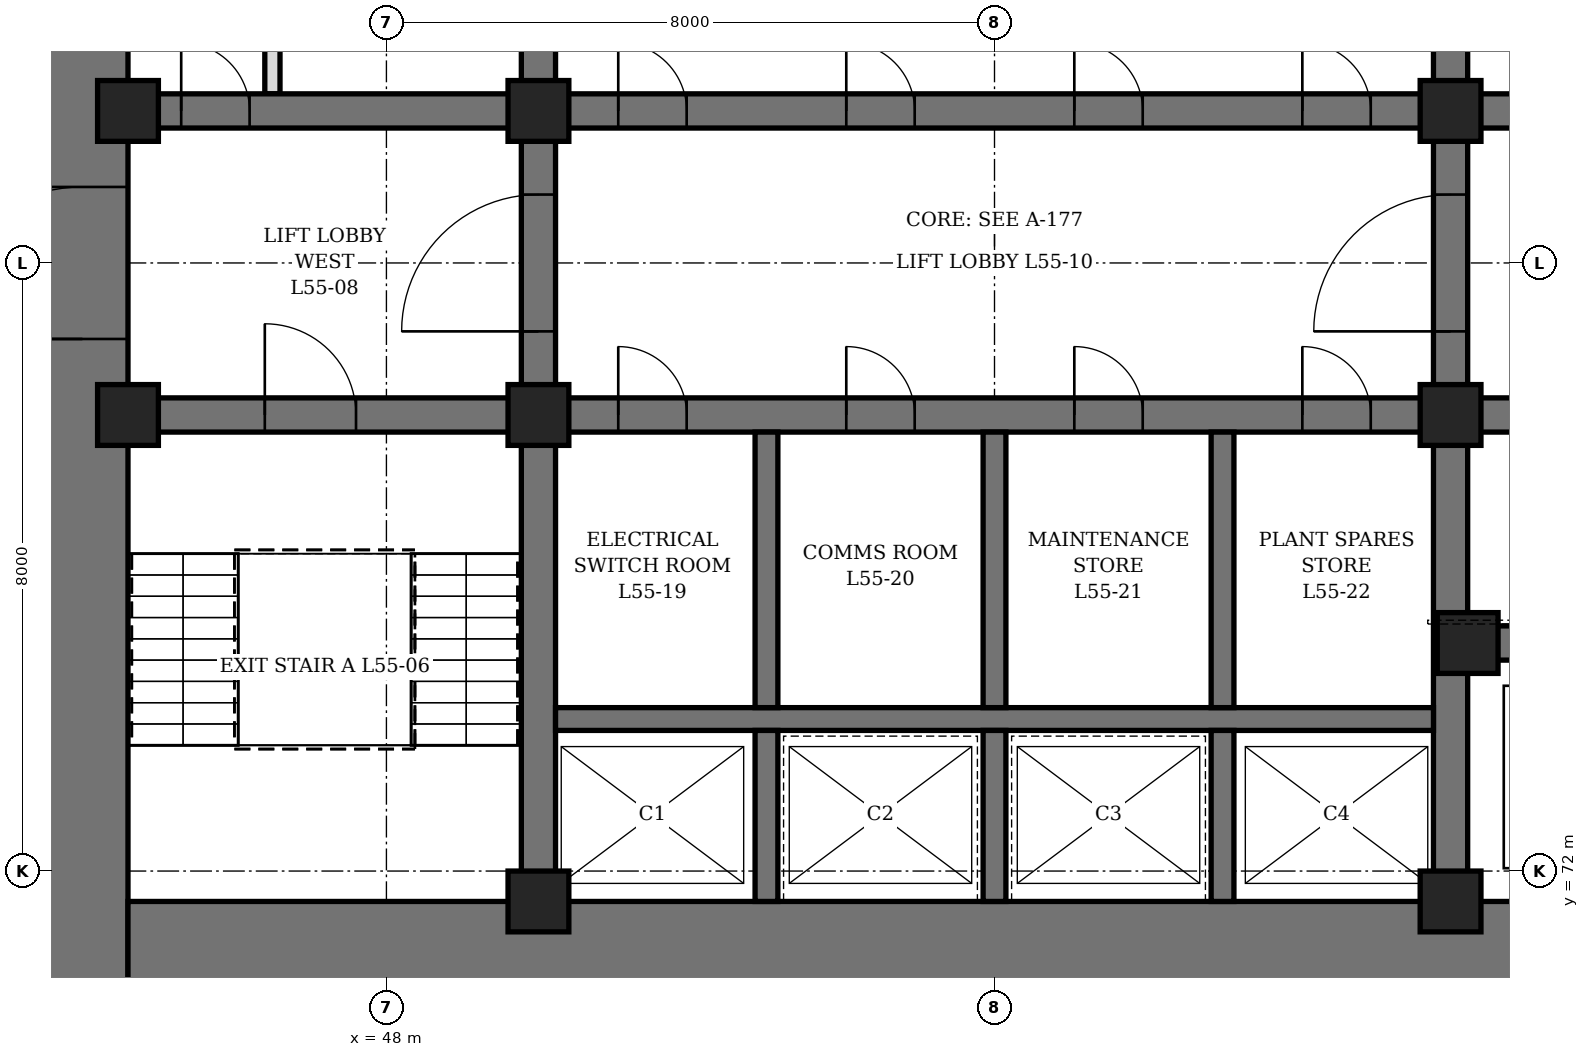
"""IFC4 building model, lengths in metres.
Left out: names, types, materials, properties, quantities, classifications, styles, units other than length and angle.
Written with IfcOpenShell. Run it as: python <this file> out.ifc"""

import sys

from ifc_helpers import new_model, si_unit, direction, frame, frame_2d, origin, origin_2d, place, context, subcontext, project, spatial, rectangle, hollow_rectangle, extrude, element, fill, save


model = new_model("IFC4")
c1 = context("Model", 3, precision=1e-05, world=origin(), true_north=direction((0.0, 1.0)))
c2 = subcontext(c1, "Body", "Model", "MODEL_VIEW")
j1 = project(units=[si_unit("LENGTHUNIT", "METRE"), si_unit("PLANEANGLEUNIT", "RADIAN")], contexts=[c1])
p1 = place(None, origin())
s1 = spatial("IfcSite", under=j1, at=p1, CompositionType="ELEMENT")
p2 = place(p1, origin())
s2 = spatial("IfcBuilding", under=s1, at=p2, CompositionType="ELEMENT")
p3 = place(p2, frame((0.0, 0.0, 244.3)))
s3 = spatial("IfcBuildingStorey", under=s2, at=p3, CompositionType="ELEMENT", Elevation=244.3)
p4 = place(p3, frame((44.0, 70.4, 0.0), z_axis=(0.0, 0.0, 1.0), x_axis=(0.0, 1.0, 0.0)))
e1 = element("IfcWall", 1, at=p4, inside=s3, PredefinedType="SHEAR", context=c2, shape_type="SweptSolid", body=[
    extrude(rectangle(XDim=19.2, YDim=1.2, at=frame_2d((9.6, 0.0))), origin(), (0.0, 0.0, 1.0), 6.0),
])
p5 = place(p4, frame((8.6, 0.0, 0.0)))
e2 = element("IfcOpeningElement", 2, at=p5, cuts=e1, PredefinedType="OPENING", context=c2, shape_type="SweptSolid", body=[
    extrude(rectangle(XDim=2.0, YDim=2.4, at=frame_2d((1.0, 1.2))), frame((0.0, 0.61, 0.0), z_axis=(0.0, -1.0, 0.0), x_axis=(1.0, 0.0, 0.0)), (0.0, 0.0, 1.0), 1.22),
])
p6 = place(p3, frame((44.6, 71.0, 0.0), z_axis=(0.0, 0.0, 1.0), x_axis=(1.0, 0.0, 0.0)))
e3 = element("IfcWall", 3, at=p6, inside=s3, PredefinedType="SHEAR", context=c2, shape_type="SweptSolid", body=[
    extrude(rectangle(XDim=22.8, YDim=1.2, at=frame_2d((11.4, 0.0))), origin(), (0.0, 0.0, 1.0), 6.0),
])
p7 = place(p3, frame((50.0, 71.6, 0.0), z_axis=(0.0, 0.0, 1.0), x_axis=(0.0, 1.0, 0.0)))
e4 = element("IfcWall", 4, at=p7, inside=s3, PredefinedType="SHEAR", context=c2, shape_type="SweptSolid", body=[
    extrude(rectangle(XDim=16.8, YDim=0.45, at=frame_2d((8.4, 0.0))), origin(), (0.0, 0.0, 1.0), 6.0),
])
p8 = place(p7, frame((7.5, 0.0, 0.0)))
e5 = element("IfcOpeningElement", 5, at=p8, cuts=e4, PredefinedType="OPENING", context=c2, shape_type="SweptSolid", body=[
    extrude(rectangle(XDim=1.8, YDim=2.4, at=frame_2d((0.9, 1.2))), frame((0.0, 0.235, 0.0), z_axis=(0.0, -1.0, 0.0), x_axis=(1.0, 0.0, 0.0)), (0.0, 0.0, 1.0), 0.47),
])
p9 = place(p3, frame((62.0, 71.6, 0.0), z_axis=(0.0, 0.0, 1.0), x_axis=(0.0, 1.0, 0.0)))
e6 = element("IfcWall", 6, at=p9, inside=s3, PredefinedType="SHEAR", context=c2, shape_type="SweptSolid", body=[
    extrude(rectangle(XDim=16.8, YDim=0.45, at=frame_2d((8.4, 0.0))), origin(), (0.0, 0.0, 1.0), 6.0),
])
p10 = place(p9, frame((7.5, 0.0, 0.0)))
e7 = element("IfcOpeningElement", 7, at=p10, cuts=e6, PredefinedType="OPENING", context=c2, shape_type="SweptSolid", body=[
    extrude(rectangle(XDim=1.8, YDim=2.4, at=frame_2d((0.9, 1.2))), frame((0.0, 0.235, 0.0), z_axis=(0.0, -1.0, 0.0), x_axis=(1.0, 0.0, 0.0)), (0.0, 0.0, 1.0), 0.47),
])
p11 = place(p3, frame((44.6, 78.0, 0.0), z_axis=(0.0, 0.0, 1.0), x_axis=(1.0, 0.0, 0.0)))
e8 = element("IfcWall", 8, at=p11, inside=s3, PredefinedType="SHEAR", context=c2, shape_type="SweptSolid", body=[
    extrude(rectangle(XDim=5.175, YDim=0.45, at=frame_2d((2.587, 0.0))), origin(), (0.0, 0.0, 1.0), 6.0),
])
p12 = place(p11, frame((1.8, 0.0, 0.0)))
e9 = element("IfcOpeningElement", 9, at=p12, cuts=e8, PredefinedType="OPENING", context=c2, shape_type="SweptSolid", body=[
    extrude(rectangle(XDim=1.2, YDim=2.1, at=frame_2d((0.6, 1.05))), frame((0.0, 0.235, 0.0), z_axis=(0.0, -1.0, 0.0), x_axis=(1.0, 0.0, 0.0)), (0.0, 0.0, 1.0), 0.47),
])
p13 = place(p3, frame((44.6, 82.0, 0.0), z_axis=(0.0, 0.0, 1.0), x_axis=(1.0, 0.0, 0.0)))
e10 = element("IfcWall", 10, at=p13, inside=s3, PredefinedType="SHEAR", context=c2, shape_type="SweptSolid", body=[
    extrude(rectangle(XDim=5.175, YDim=0.45, at=frame_2d((2.587, 0.0))), origin(), (0.0, 0.0, 1.0), 6.0),
])
p14 = place(p13, frame((0.7, 0.0, 0.0)))
e11 = element("IfcOpeningElement", 11, at=p14, cuts=e10, PredefinedType="OPENING", context=c2, shape_type="SweptSolid", body=[
    extrude(rectangle(XDim=0.9, YDim=2.1, at=frame_2d((0.45, 1.05))), frame((0.0, 0.235, 0.0), z_axis=(0.0, -1.0, 0.0), x_axis=(1.0, 0.0, 0.0)), (0.0, 0.0, 1.0), 0.47),
])
p15 = place(p3, frame((62.225, 75.0, 0.0), z_axis=(0.0, 0.0, 1.0), x_axis=(1.0, 0.0, 0.0)))
e12 = element("IfcWall", 12, at=p15, inside=s3, PredefinedType="SHEAR", context=c2, shape_type="SweptSolid", body=[
    extrude(rectangle(XDim=5.175, YDim=0.45, at=frame_2d((2.587, 0.0))), origin(), (0.0, 0.0, 1.0), 6.0),
])
p16 = place(p15, frame((0.675, 0.0, 0.0)))
e13 = element("IfcOpeningElement", 13, at=p16, cuts=e12, PredefinedType="OPENING", context=c2, shape_type="SweptSolid", body=[
    extrude(rectangle(XDim=1.2, YDim=2.2, at=frame_2d((0.6, 1.1))), frame((0.0, 0.235, 0.0), z_axis=(0.0, -1.0, 0.0), x_axis=(1.0, 0.0, 0.0)), (0.0, 0.0, 1.0), 0.47),
])
p17 = place(p15, frame((3.425, 0.0, 0.0)))
e14 = element("IfcOpeningElement", 14, at=p17, cuts=e12, PredefinedType="OPENING", context=c2, shape_type="SweptSolid", body=[
    extrude(rectangle(XDim=1.2, YDim=2.2, at=frame_2d((0.6, 1.1))), frame((0.0, 0.235, 0.0), z_axis=(0.0, -1.0, 0.0), x_axis=(1.0, 0.0, 0.0)), (0.0, 0.0, 1.0), 0.47),
])
p18 = place(p3, frame((62.225, 78.0, 0.0), z_axis=(0.0, 0.0, 1.0), x_axis=(1.0, 0.0, 0.0)))
e15 = element("IfcWall", 15, at=p18, inside=s3, PredefinedType="SHEAR", context=c2, shape_type="SweptSolid", body=[
    extrude(rectangle(XDim=5.175, YDim=0.45, at=frame_2d((2.587, 0.0))), origin(), (0.0, 0.0, 1.0), 6.0),
])
p19 = place(p18, frame((2.175, 0.0, 0.0)))
e16 = element("IfcOpeningElement", 16, at=p19, cuts=e15, PredefinedType="OPENING", context=c2, shape_type="SweptSolid", body=[
    extrude(rectangle(XDim=1.2, YDim=2.1, at=frame_2d((0.6, 1.05))), frame((0.0, 0.235, 0.0), z_axis=(0.0, -1.0, 0.0), x_axis=(1.0, 0.0, 0.0)), (0.0, 0.0, 1.0), 0.47),
])
p20 = place(p3, frame((62.225, 82.0, 0.0), z_axis=(0.0, 0.0, 1.0), x_axis=(1.0, 0.0, 0.0)))
e17 = element("IfcWall", 17, at=p20, inside=s3, PredefinedType="SHEAR", context=c2, shape_type="SweptSolid", body=[
    extrude(rectangle(XDim=5.175, YDim=0.45, at=frame_2d((2.587, 0.0))), origin(), (0.0, 0.0, 1.0), 6.0),
])
p21 = place(p20, frame((2.175, 0.0, 0.0)))
e18 = element("IfcOpeningElement", 18, at=p21, cuts=e17, PredefinedType="OPENING", context=c2, shape_type="SweptSolid", body=[
    extrude(rectangle(XDim=1.2, YDim=2.1, at=frame_2d((0.6, 1.05))), frame((0.0, 0.235, 0.0), z_axis=(0.0, -1.0, 0.0), x_axis=(1.0, 0.0, 0.0)), (0.0, 0.0, 1.0), 0.47),
])
p22 = place(p3, frame((50.225, 78.0, 0.0), z_axis=(0.0, 0.0, 1.0), x_axis=(1.0, 0.0, 0.0)))
e19 = element("IfcWall", 19, at=p22, inside=s3, PredefinedType="SHEAR", context=c2, shape_type="SweptSolid", body=[
    extrude(rectangle(XDim=11.55, YDim=0.45, at=frame_2d((5.775, 0.0))), origin(), (0.0, 0.0, 1.0), 6.0),
])
p23 = place(p22, frame((0.825, 0.0, 0.0)))
e20 = element("IfcOpeningElement", 20, at=p23, cuts=e19, PredefinedType="OPENING", context=c2, shape_type="SweptSolid", body=[
    extrude(rectangle(XDim=0.9, YDim=2.1, at=frame_2d((0.45, 1.05))), frame((0.0, 0.235, 0.0), z_axis=(0.0, -1.0, 0.0), x_axis=(1.0, 0.0, 0.0)), (0.0, 0.0, 1.0), 0.47),
])
p24 = place(p22, frame((3.825, 0.0, 0.0)))
e21 = element("IfcOpeningElement", 21, at=p24, cuts=e19, PredefinedType="OPENING", context=c2, shape_type="SweptSolid", body=[
    extrude(rectangle(XDim=0.9, YDim=2.1, at=frame_2d((0.45, 1.05))), frame((0.0, 0.235, 0.0), z_axis=(0.0, -1.0, 0.0), x_axis=(1.0, 0.0, 0.0)), (0.0, 0.0, 1.0), 0.47),
])
p25 = place(p22, frame((6.825, 0.0, 0.0)))
e22 = element("IfcOpeningElement", 22, at=p25, cuts=e19, PredefinedType="OPENING", context=c2, shape_type="SweptSolid", body=[
    extrude(rectangle(XDim=0.9, YDim=2.1, at=frame_2d((0.45, 1.05))), frame((0.0, 0.235, 0.0), z_axis=(0.0, -1.0, 0.0), x_axis=(1.0, 0.0, 0.0)), (0.0, 0.0, 1.0), 0.47),
])
p26 = place(p22, frame((9.825, 0.0, 0.0)))
e23 = element("IfcOpeningElement", 23, at=p26, cuts=e19, PredefinedType="OPENING", context=c2, shape_type="SweptSolid", body=[
    extrude(rectangle(XDim=0.9, YDim=2.1, at=frame_2d((0.45, 1.05))), frame((0.0, 0.235, 0.0), z_axis=(0.0, -1.0, 0.0), x_axis=(1.0, 0.0, 0.0)), (0.0, 0.0, 1.0), 0.47),
])
p27 = place(p3, frame((50.225, 82.0, 0.0), z_axis=(0.0, 0.0, 1.0), x_axis=(1.0, 0.0, 0.0)))
e24 = element("IfcWall", 24, at=p27, inside=s3, PredefinedType="SHEAR", context=c2, shape_type="SweptSolid", body=[
    extrude(rectangle(XDim=11.55, YDim=0.45, at=frame_2d((5.775, 0.0))), origin(), (0.0, 0.0, 1.0), 6.0),
])
p28 = place(p27, frame((0.825, 0.0, 0.0)))
e25 = element("IfcOpeningElement", 25, at=p28, cuts=e24, PredefinedType="OPENING", context=c2, shape_type="SweptSolid", body=[
    extrude(rectangle(XDim=0.9, YDim=2.1, at=frame_2d((0.45, 1.05))), frame((0.0, 0.235, 0.0), z_axis=(0.0, -1.0, 0.0), x_axis=(1.0, 0.0, 0.0)), (0.0, 0.0, 1.0), 0.47),
])
p29 = place(p27, frame((3.825, 0.0, 0.0)))
e26 = element("IfcOpeningElement", 26, at=p29, cuts=e24, PredefinedType="OPENING", context=c2, shape_type="SweptSolid", body=[
    extrude(rectangle(XDim=0.9, YDim=2.1, at=frame_2d((0.45, 1.05))), frame((0.0, 0.235, 0.0), z_axis=(0.0, -1.0, 0.0), x_axis=(1.0, 0.0, 0.0)), (0.0, 0.0, 1.0), 0.47),
])
p30 = place(p27, frame((6.825, 0.0, 0.0)))
e27 = element("IfcOpeningElement", 27, at=p30, cuts=e24, PredefinedType="OPENING", context=c2, shape_type="SweptSolid", body=[
    extrude(rectangle(XDim=0.9, YDim=2.1, at=frame_2d((0.45, 1.05))), frame((0.0, 0.235, 0.0), z_axis=(0.0, -1.0, 0.0), x_axis=(1.0, 0.0, 0.0)), (0.0, 0.0, 1.0), 0.47),
])
p31 = place(p27, frame((9.825, 0.0, 0.0)))
e28 = element("IfcOpeningElement", 28, at=p31, cuts=e24, PredefinedType="OPENING", context=c2, shape_type="SweptSolid", body=[
    extrude(rectangle(XDim=0.9, YDim=2.1, at=frame_2d((0.45, 1.05))), frame((0.0, 0.235, 0.0), z_axis=(0.0, -1.0, 0.0), x_axis=(1.0, 0.0, 0.0)), (0.0, 0.0, 1.0), 0.47),
])
p32 = place(p3, frame((50.225, 74.0, 0.0), z_axis=(0.0, 0.0, 1.0), x_axis=(1.0, 0.0, 0.0)))
e29 = element("IfcWall", 29, at=p32, inside=s3, PredefinedType="SHEAR", context=c2, shape_type="SweptSolid", body=[
    extrude(rectangle(XDim=11.55, YDim=0.3, at=frame_2d((5.775, 0.0))), origin(), (0.0, 0.0, 1.0), 6.0),
])
p33 = place(p3, frame((53.0, 71.6, 0.0), z_axis=(0.0, 0.0, 1.0), x_axis=(0.0, 1.0, 0.0)))
e30 = element("IfcWall", 30, at=p33, inside=s3, PredefinedType="SHEAR", context=c2, shape_type="SweptSolid", body=[
    extrude(rectangle(XDim=2.25, YDim=0.3, at=frame_2d((1.125, 0.0))), origin(), (0.0, 0.0, 1.0), 6.0),
])
p34 = place(p3, frame((53.0, 74.15, 0.0), z_axis=(0.0, 0.0, 1.0), x_axis=(0.0, 1.0, 0.0)))
e31 = element("IfcWall", 31, at=p34, inside=s3, PredefinedType="SHEAR", context=c2, shape_type="SweptSolid", body=[
    extrude(rectangle(XDim=3.625, YDim=0.3, at=frame_2d((1.812, 0.0))), origin(), (0.0, 0.0, 1.0), 6.0),
])
p35 = place(p3, frame((56.0, 71.6, 0.0), z_axis=(0.0, 0.0, 1.0), x_axis=(0.0, 1.0, 0.0)))
e32 = element("IfcWall", 32, at=p35, inside=s3, PredefinedType="SHEAR", context=c2, shape_type="SweptSolid", body=[
    extrude(rectangle(XDim=2.25, YDim=0.3, at=frame_2d((1.125, 0.0))), origin(), (0.0, 0.0, 1.0), 6.0),
])
p36 = place(p3, frame((56.0, 74.15, 0.0), z_axis=(0.0, 0.0, 1.0), x_axis=(0.0, 1.0, 0.0)))
e33 = element("IfcWall", 33, at=p36, inside=s3, PredefinedType="SHEAR", context=c2, shape_type="SweptSolid", body=[
    extrude(rectangle(XDim=3.625, YDim=0.3, at=frame_2d((1.812, 0.0))), origin(), (0.0, 0.0, 1.0), 6.0),
])
p37 = place(p3, frame((59.0, 71.6, 0.0), z_axis=(0.0, 0.0, 1.0), x_axis=(0.0, 1.0, 0.0)))
e34 = element("IfcWall", 34, at=p37, inside=s3, PredefinedType="SHEAR", context=c2, shape_type="SweptSolid", body=[
    extrude(rectangle(XDim=2.25, YDim=0.3, at=frame_2d((1.125, 0.0))), origin(), (0.0, 0.0, 1.0), 6.0),
])
p38 = place(p3, frame((59.0, 74.15, 0.0), z_axis=(0.0, 0.0, 1.0), x_axis=(0.0, 1.0, 0.0)))
e35 = element("IfcWall", 35, at=p38, inside=s3, PredefinedType="SHEAR", context=c2, shape_type="SweptSolid", body=[
    extrude(rectangle(XDim=3.625, YDim=0.3, at=frame_2d((1.812, 0.0))), origin(), (0.0, 0.0, 1.0), 6.0),
])
for number, where, z_axis, x_axis in (
    (36, (44.6, 78.0, 0.0), (0.0, 0.0, 1.0), (1.0, 0.0, 0.0)),
    (37, (44.6, 82.0, 0.0), (0.0, 0.0, 1.0), (1.0, 0.0, 0.0)),
    (38, (50.0, 71.6, 0.0), (0.0, 0.0, 1.0), (1.0, 0.0, 0.0)),
    (39, (50.0, 78.0, 0.0), (0.0, 0.0, 1.0), (1.0, 0.0, 0.0)),
    (40, (50.0, 82.0, 0.0), (0.0, 0.0, 1.0), (1.0, 0.0, 0.0)),
    (41, (62.0, 71.6, 0.0), (0.0, 0.0, 1.0), (1.0, 0.0, 0.0)),
    (42, (62.0, 78.0, 0.0), (0.0, 0.0, 1.0), (1.0, 0.0, 0.0)),
    (43, (62.0, 82.0, 0.0), (0.0, 0.0, 1.0), (1.0, 0.0, 0.0)),
    (44, (62.225, 75.0, 0.0), (0.0, 0.0, 1.0), (1.0, 0.0, 0.0)),
):
    element("IfcColumn", number, at=place(p3, frame(where, z_axis=z_axis, x_axis=x_axis)), inside=s3, PredefinedType="COLUMN", context=c2, shape_type="SweptSolid", body=[
        extrude(hollow_rectangle(XDim=0.8, YDim=0.8, WallThickness=0.1, at=origin_2d()), origin(), (0.0, 0.0, 1.0), 6.0),
    ])
p39 = place(p3, frame((46.5, 82.225, 0.0), z_axis=(0.0, 0.0, 1.0), x_axis=(0.0, 1.0, 0.0)))
e45 = element("IfcWall", 45, at=p39, inside=s3, PredefinedType="PARTITIONING", context=c2, shape_type="SweptSolid", body=[
    extrude(rectangle(XDim=3.05, YDim=0.2, at=frame_2d((1.525, 0.0))), origin(), (0.0, 0.0, 1.0), 5.84),
])
p40 = place(p39, frame((1.075, 0.0, 0.0)))
e46 = element("IfcOpeningElement", 46, at=p40, cuts=e45, PredefinedType="OPENING", context=c2, shape_type="SweptSolid", body=[
    extrude(rectangle(XDim=0.9, YDim=2.1, at=frame_2d((0.45, 1.05))), frame((0.0, 0.11, 0.0), z_axis=(0.0, -1.0, 0.0), x_axis=(1.0, 0.0, 0.0)), (0.0, 0.0, 1.0), 0.22),
])
p41 = place(p14, origin())
e47 = element("IfcDoor", 47, at=p41, inside=s3, OperationType="SINGLE_SWING_LEFT", PredefinedType="DOOR", context=c2, shape_type="SweptSolid", body=[
    extrude(rectangle(XDim=0.9, YDim=2.1, at=frame_2d((0.45, 1.05))), frame((0.0, 0.225, 0.0), z_axis=(0.0, -1.0, 0.0), x_axis=(1.0, 0.0, 0.0)), (0.0, 0.0, 1.0), 0.449),
])
fill(e11, e47)
p42 = place(p23, origin())
e48 = element("IfcDoor", 48, at=p42, inside=s3, OperationType="SINGLE_SWING_LEFT", PredefinedType="DOOR", context=c2, shape_type="SweptSolid", body=[
    extrude(rectangle(XDim=0.9, YDim=2.1, at=frame_2d((0.45, 1.05))), frame((0.0, 0.225, 0.0), z_axis=(0.0, -1.0, 0.0), x_axis=(1.0, 0.0, 0.0)), (0.0, 0.0, 1.0), 0.449),
])
fill(e20, e48)
p43 = place(p24, origin())
e49 = element("IfcDoor", 49, at=p43, inside=s3, OperationType="SINGLE_SWING_LEFT", PredefinedType="DOOR", context=c2, shape_type="SweptSolid", body=[
    extrude(rectangle(XDim=0.9, YDim=2.1, at=frame_2d((0.45, 1.05))), frame((0.0, 0.225, 0.0), z_axis=(0.0, -1.0, 0.0), x_axis=(1.0, 0.0, 0.0)), (0.0, 0.0, 1.0), 0.449),
])
fill(e21, e49)
p44 = place(p25, origin())
e50 = element("IfcDoor", 50, at=p44, inside=s3, OperationType="SINGLE_SWING_LEFT", PredefinedType="DOOR", context=c2, shape_type="SweptSolid", body=[
    extrude(rectangle(XDim=0.9, YDim=2.1, at=frame_2d((0.45, 1.05))), frame((0.0, 0.225, 0.0), z_axis=(0.0, -1.0, 0.0), x_axis=(1.0, 0.0, 0.0)), (0.0, 0.0, 1.0), 0.449),
])
fill(e22, e50)
p45 = place(p26, origin())
e51 = element("IfcDoor", 51, at=p45, inside=s3, OperationType="SINGLE_SWING_LEFT", PredefinedType="DOOR", context=c2, shape_type="SweptSolid", body=[
    extrude(rectangle(XDim=0.9, YDim=2.1, at=frame_2d((0.45, 1.05))), frame((0.0, 0.225, 0.0), z_axis=(0.0, -1.0, 0.0), x_axis=(1.0, 0.0, 0.0)), (0.0, 0.0, 1.0), 0.449),
])
fill(e23, e51)
p46 = place(p28, origin())
e52 = element("IfcDoor", 52, at=p46, inside=s3, OperationType="SINGLE_SWING_LEFT", PredefinedType="DOOR", context=c2, shape_type="SweptSolid", body=[
    extrude(rectangle(XDim=0.9, YDim=2.1, at=frame_2d((0.45, 1.05))), frame((0.0, 0.225, 0.0), z_axis=(0.0, -1.0, 0.0), x_axis=(1.0, 0.0, 0.0)), (0.0, 0.0, 1.0), 0.449),
])
fill(e25, e52)
p47 = place(p29, origin())
e53 = element("IfcDoor", 53, at=p47, inside=s3, OperationType="SINGLE_SWING_LEFT", PredefinedType="DOOR", context=c2, shape_type="SweptSolid", body=[
    extrude(rectangle(XDim=0.9, YDim=2.1, at=frame_2d((0.45, 1.05))), frame((0.0, 0.225, 0.0), z_axis=(0.0, -1.0, 0.0), x_axis=(1.0, 0.0, 0.0)), (0.0, 0.0, 1.0), 0.449),
])
fill(e26, e53)
p48 = place(p30, origin())
e54 = element("IfcDoor", 54, at=p48, inside=s3, OperationType="SINGLE_SWING_LEFT", PredefinedType="DOOR", context=c2, shape_type="SweptSolid", body=[
    extrude(rectangle(XDim=0.9, YDim=2.1, at=frame_2d((0.45, 1.05))), frame((0.0, 0.225, 0.0), z_axis=(0.0, -1.0, 0.0), x_axis=(1.0, 0.0, 0.0)), (0.0, 0.0, 1.0), 0.449),
])
fill(e27, e54)
p49 = place(p31, origin())
e55 = element("IfcDoor", 55, at=p49, inside=s3, OperationType="SINGLE_SWING_LEFT", PredefinedType="DOOR", context=c2, shape_type="SweptSolid", body=[
    extrude(rectangle(XDim=0.9, YDim=2.1, at=frame_2d((0.45, 1.05))), frame((0.0, 0.225, 0.0), z_axis=(0.0, -1.0, 0.0), x_axis=(1.0, 0.0, 0.0)), (0.0, 0.0, 1.0), 0.449),
])
fill(e28, e55)
p50 = place(p12, origin())
e56 = element("IfcDoor", 56, at=p50, inside=s3, OperationType="SINGLE_SWING_LEFT", PredefinedType="DOOR", context=c2, shape_type="SweptSolid", body=[
    extrude(rectangle(XDim=1.2, YDim=2.1, at=frame_2d((0.6, 1.05))), frame((0.0, 0.225, 0.0), z_axis=(0.0, -1.0, 0.0), x_axis=(1.0, 0.0, 0.0)), (0.0, 0.0, 1.0), 0.449),
])
fill(e9, e56)
p51 = place(p5, origin())
e57 = element("IfcDoor", 57, at=p51, inside=s3, OperationType="DOUBLE_DOOR_SINGLE_SWING", PredefinedType="DOOR", context=c2, shape_type="SweptSolid", body=[
    extrude(rectangle(XDim=2.0, YDim=2.4, at=frame_2d((1.0, 1.2))), frame((0.0, 0.35, 0.0), z_axis=(0.0, -1.0, 0.0), x_axis=(1.0, 0.0, 0.0)), (0.0, 0.0, 1.0), 0.7),
])
fill(e2, e57)
p52 = place(p8, origin())
e58 = element("IfcDoor", 58, at=p52, inside=s3, OperationType="DOUBLE_DOOR_SINGLE_SWING", PredefinedType="DOOR", context=c2, shape_type="SweptSolid", body=[
    extrude(rectangle(XDim=1.8, YDim=2.4, at=frame_2d((0.9, 1.2))), frame((0.0, 0.225, 0.0), z_axis=(0.0, -1.0, 0.0), x_axis=(1.0, 0.0, 0.0)), (0.0, 0.0, 1.0), 0.449),
])
fill(e5, e58)
p53 = place(p10, origin())
e59 = element("IfcDoor", 59, at=p53, inside=s3, OperationType="DOUBLE_DOOR_SINGLE_SWING", PredefinedType="DOOR", context=c2, shape_type="SweptSolid", body=[
    extrude(rectangle(XDim=1.8, YDim=2.4, at=frame_2d((0.9, 1.2))), frame((0.0, 0.225, 0.0), z_axis=(0.0, -1.0, 0.0), x_axis=(1.0, 0.0, 0.0)), (0.0, 0.0, 1.0), 0.449),
])
fill(e7, e59)
save(model, sys.argv[1])
